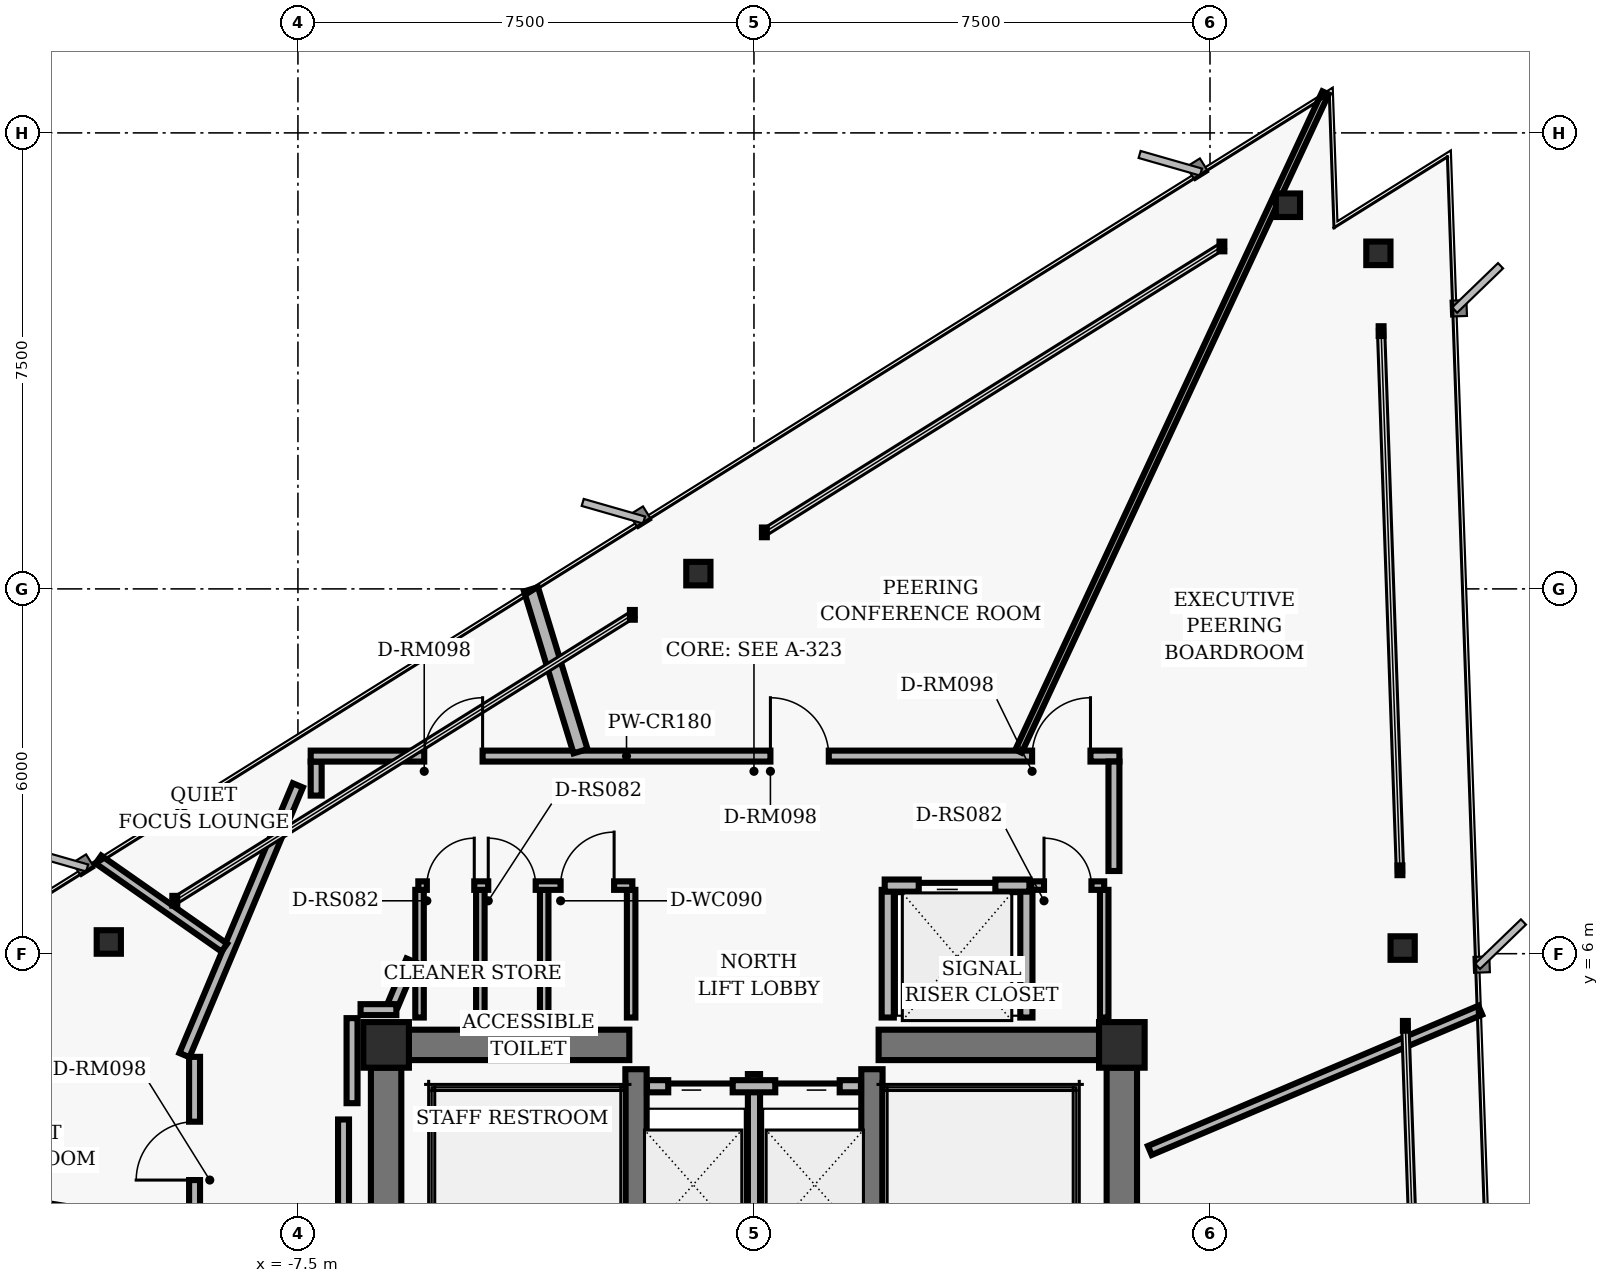
"""IFC4 building model, lengths in metres.
Left out: names, types, materials, properties, quantities, classifications, styles, units other than length and angle.
Written with IfcOpenShell. Run it as: python <this file> out.ifc"""

import sys

from ifc_helpers import new_model, si_unit, direction, frame, frame_2d, origin, origin_2d, place, context, subcontext, project, spatial, rectangle, hollow_rectangle, i_section, extrude, element, fill, save


model = new_model("IFC4")
c1 = context("Model", 3, precision=1e-05, world=origin(), true_north=direction((0.0, 1.0)))
c2 = subcontext(c1, "Body", "Model", "MODEL_VIEW")
j1 = project(units=[si_unit("LENGTHUNIT", "METRE"), si_unit("PLANEANGLEUNIT", "RADIAN")], contexts=[c1])
p1 = place(None, origin())
s1 = spatial("IfcSite", under=j1, at=p1, CompositionType="ELEMENT")
p2 = place(p1, origin())
s2 = spatial("IfcBuilding", under=s1, at=p2, CompositionType="ELEMENT")
p3 = place(p2, frame((0.0, 0.0, 199.68)))
s3 = spatial("IfcBuildingStorey", under=s2, at=p3, CompositionType="ELEMENT", Elevation=199.68)
for number, where, z_axis, x_axis in (
    (1, (-6.05, 4.5, 0.0), (0.0, 0.0, 1.0), (1.0, 0.0, 0.0)),
    (2, (6.05, 4.5, 0.0), (0.0, 0.0, 1.0), (1.0, 0.0, 0.0)),
):
    element("IfcColumn", number, at=place(p3, frame(where, z_axis=z_axis, x_axis=x_axis)), inside=s3, PredefinedType="COLUMN", context=c2, shape_type="SweptSolid", body=[
        extrude(hollow_rectangle(XDim=0.75, YDim=0.75, WallThickness=0.05, InnerFilletRadius=0.02, OuterFilletRadius=0.04, at=origin_2d()), origin(), (0.0, 0.0, 1.0), 3.04),
    ])
for number, where, z_axis, x_axis in (
    (3, (-6.05, 0.375, 0.0), (0.0, 0.0, 1.0), (0.0, 1.0, 0.0)),
    (4, (6.05, 0.375, 0.0), (0.0, 0.0, 1.0), (0.0, 1.0, 0.0)),
):
    element("IfcWall", number, at=place(p3, frame(where, z_axis=z_axis, x_axis=x_axis)), inside=s3, PredefinedType="SHEAR", context=c2, shape_type="SweptSolid", body=[
        extrude(rectangle(XDim=3.75, YDim=0.5, at=frame_2d((1.875, 0.0))), origin(), (0.0, 0.0, 1.0), 2.798),
    ])
for number, where, z_axis, x_axis in (
    (5, (-1.94, -4.1, 0.0), (0.0, 0.0, 1.0), (0.0, 1.0, 0.0)),
    (6, (1.94, -4.1, 0.0), (0.0, 0.0, 1.0), (0.0, 1.0, 0.0)),
):
    element("IfcWall", number, at=place(p3, frame(where, z_axis=z_axis, x_axis=x_axis)), inside=s3, PredefinedType="SHEAR", context=c2, shape_type="SweptSolid", body=[
        extrude(rectangle(XDim=8.2, YDim=0.35, at=frame_2d((4.1, 0.0))), origin(), (0.0, 0.0, 1.0), 2.798),
    ])
for number, where, z_axis, x_axis in (
    (7, (-5.675, 4.5, 0.0), (0.0, 0.0, 1.0), (1.0, 0.0, 0.0)),
    (8, (2.05, 4.5, 0.0), (0.0, 0.0, 1.0), (1.0, 0.0, 0.0)),
):
    element("IfcWall", number, at=place(p3, frame(where, z_axis=z_axis, x_axis=x_axis)), inside=s3, PredefinedType="SHEAR", context=c2, shape_type="SweptSolid", body=[
        extrude(rectangle(XDim=3.625, YDim=0.5, at=frame_2d((1.812, 0.0))), origin(), (0.0, 0.0, 1.0), 2.798),
    ])
for number, where, z_axis, x_axis in (
    (9, (10.668, 6.093, 0.0), (0.0, 0.0, 1.0), (1.0, 0.0, 0.0)),
    (10, (10.269, 17.519, 0.0), (0.0, 0.0, 1.0), (1.0, 0.0, 0.0)),
    (11, (8.781, 18.31, 0.0), (0.0, 0.0, 1.0), (1.0, 0.0, 0.0)),
    (12, (-0.915, 12.251, 0.0), (0.0, 0.0, 1.0), (1.0, 0.0, 0.0)),
    (13, (-10.611, 6.193, 0.0), (0.0, 0.0, 1.0), (1.0, 0.0, 0.0)),
):
    element("IfcColumn", number, at=place(p3, frame(where, z_axis=z_axis, x_axis=x_axis)), inside=s3, PredefinedType="COLUMN", context=c2, shape_type="SweptSolid", body=[
        extrude(i_section(OverallWidth=0.398, OverallDepth=0.387, WebThickness=0.021, FlangeThickness=0.033, FilletRadius=0.018, at=origin_2d()), origin(), (0.0, 0.0, 1.0), 3.04),
    ])
p4 = place(p3, frame((0.0, 1.25, 0.0), z_axis=(0.0, 0.0, 1.0), x_axis=(0.0, 1.0, 0.0)))
e14 = element("IfcWall", 14, at=p4, inside=s3, PredefinedType="PARTITIONING", context=c2, shape_type="SweptSolid", body=[
    extrude(rectangle(XDim=2.77, YDim=0.2, at=frame_2d((1.385, 0.0))), origin(), (0.0, 0.0, 1.0), 2.773),
])
p5 = place(p3, frame((-1.76, 3.82, 0.0), z_axis=(0.0, 0.0, 1.0), x_axis=(1.0, 0.0, 0.0)))
e15 = element("IfcWall", 15, at=p5, inside=s3, PredefinedType="PARTITIONING", context=c2, shape_type="SweptSolid", body=[
    extrude(rectangle(XDim=3.52, YDim=0.2, at=frame_2d((1.76, 0.0))), origin(), (0.0, 0.0, 1.0), 2.773),
])
p6 = place(p5, frame((0.35, 0.0, 0.0)))
e16 = element("IfcOpeningElement", 16, at=p6, cuts=e15, PredefinedType="OPENING", context=c2, shape_type="SweptSolid", body=[
    extrude(rectangle(XDim=1.06, YDim=2.04, at=frame_2d((0.53, 1.02))), frame((0.0, 0.11, 0.0), z_axis=(0.0, -1.0, 0.0), x_axis=(1.0, 0.0, 0.0)), (0.0, 0.0, 1.0), 0.22),
])
p7 = place(p5, frame((2.11, 0.0, 0.0)))
e17 = element("IfcOpeningElement", 17, at=p7, cuts=e15, PredefinedType="OPENING", context=c2, shape_type="SweptSolid", body=[
    extrude(rectangle(XDim=1.06, YDim=2.04, at=frame_2d((0.53, 1.02))), frame((0.0, 0.11, 0.0), z_axis=(0.0, -1.0, 0.0), x_axis=(1.0, 0.0, 0.0)), (0.0, 0.0, 1.0), 0.22),
])
for number, where, z_axis, x_axis in (
    (18, (2.2, 4.95, 0.0), (0.0, 0.0, 1.0), (0.0, 1.0, 0.0)),
    (19, (4.48, 4.95, 0.0), (0.0, 0.0, 1.0), (0.0, 1.0, 0.0)),
):
    element("IfcWall", number, at=place(p3, frame(where, z_axis=z_axis, x_axis=x_axis)), inside=s3, PredefinedType="PARTITIONING", context=c2, shape_type="SweptSolid", body=[
        extrude(rectangle(XDim=2.1, YDim=0.2, at=frame_2d((1.05, 0.0))), origin(), (0.0, 0.0, 1.0), 2.773),
    ])
p8 = place(p3, frame((2.15, 7.12, 0.0), z_axis=(0.0, 0.0, 1.0), x_axis=(1.0, 0.0, 0.0)))
e20 = element("IfcWall", 20, at=p8, inside=s3, PredefinedType="PARTITIONING", context=c2, shape_type="SweptSolid", body=[
    extrude(rectangle(XDim=2.38, YDim=0.2, at=frame_2d((1.19, 0.0))), origin(), (0.0, 0.0, 1.0), 2.773),
])
p9 = place(p8, frame((0.56, 0.0, 0.0)))
e21 = element("IfcOpeningElement", 21, at=p9, cuts=e20, PredefinedType="OPENING", context=c2, shape_type="SweptSolid", body=[
    extrude(rectangle(XDim=1.26, YDim=2.06, at=frame_2d((0.63, 1.03))), frame((0.0, 0.11, 0.0), z_axis=(0.0, -1.0, 0.0), x_axis=(1.0, 0.0, 0.0)), (0.0, 0.0, 1.0), 0.22),
])
for number, where, z_axis, x_axis in (
    (22, (-5.5, 4.95, 0.0), (0.0, 0.0, 1.0), (0.0, 1.0, 0.0)),
    (23, (-4.5, 4.95, 0.0), (0.0, 0.0, 1.0), (0.0, 1.0, 0.0)),
    (24, (-3.45, 4.95, 0.0), (0.0, 0.0, 1.0), (0.0, 1.0, 0.0)),
    (25, (-2.02, 4.95, 0.0), (0.0, 0.0, 1.0), (0.0, 1.0, 0.0)),
):
    element("IfcWall", number, at=place(p3, frame(where, z_axis=z_axis, x_axis=x_axis)), inside=s3, PredefinedType="PARTITIONING", context=c2, shape_type="SweptSolid", body=[
        extrude(rectangle(XDim=2.1, YDim=0.14, at=frame_2d((1.05, 0.0))), origin(), (0.0, 0.0, 1.0), 2.773),
    ])
p10 = place(p3, frame((-5.52, 7.12, 0.0), z_axis=(0.0, 0.0, 1.0), x_axis=(1.0, 0.0, 0.0)))
e26 = element("IfcWall", 26, at=p10, inside=s3, PredefinedType="PARTITIONING", context=c2, shape_type="SweptSolid", body=[
    extrude(rectangle(XDim=3.52, YDim=0.14, at=frame_2d((1.76, 0.0))), origin(), (0.0, 0.0, 1.0), 2.773),
])
p11 = place(p10, frame((0.14, 0.0, 0.0)))
e27 = element("IfcOpeningElement", 27, at=p11, cuts=e26, PredefinedType="OPENING", context=c2, shape_type="SweptSolid", body=[
    extrude(rectangle(XDim=0.78, YDim=2.01, at=frame_2d((0.39, 1.005))), frame((0.0, 0.08, 0.0), z_axis=(0.0, -1.0, 0.0), x_axis=(1.0, 0.0, 0.0)), (0.0, 0.0, 1.0), 0.16),
])
p12 = place(p10, frame((1.15, 0.0, 0.0)))
e28 = element("IfcOpeningElement", 28, at=p12, cuts=e26, PredefinedType="OPENING", context=c2, shape_type="SweptSolid", body=[
    extrude(rectangle(XDim=0.78, YDim=2.01, at=frame_2d((0.39, 1.005))), frame((0.0, 0.08, 0.0), z_axis=(0.0, -1.0, 0.0), x_axis=(1.0, 0.0, 0.0)), (0.0, 0.0, 1.0), 0.16),
])
p13 = place(p10, frame((2.34, 0.0, 0.0)))
e29 = element("IfcOpeningElement", 29, at=p13, cuts=e26, PredefinedType="OPENING", context=c2, shape_type="SweptSolid", body=[
    extrude(rectangle(XDim=0.88, YDim=2.02, at=frame_2d((0.44, 1.01))), frame((0.0, 0.08, 0.0), z_axis=(0.0, -1.0, 0.0), x_axis=(1.0, 0.0, 0.0)), (0.0, 0.0, 1.0), 0.16),
])
p14 = place(p3, frame((5.76, 4.95, 0.0), z_axis=(0.0, 0.0, 1.0), x_axis=(0.0, 1.0, 0.0)))
e30 = element("IfcWall", 30, at=p14, inside=s3, PredefinedType="PARTITIONING", context=c2, shape_type="SweptSolid", body=[
    extrude(rectangle(XDim=2.1, YDim=0.14, at=frame_2d((1.05, 0.0))), origin(), (0.0, 0.0, 1.0), 2.253),
])
p15 = place(p3, frame((4.56, 7.12, 0.0), z_axis=(0.0, 0.0, 1.0), x_axis=(1.0, 0.0, 0.0)))
e31 = element("IfcWall", 31, at=p15, inside=s3, PredefinedType="PARTITIONING", context=c2, shape_type="SweptSolid", body=[
    extrude(rectangle(XDim=1.2, YDim=0.14, at=frame_2d((0.6, 0.0))), origin(), (0.0, 0.0, 1.0), 2.773),
])
p16 = place(p15, frame((0.21, 0.0, 0.0)))
e32 = element("IfcOpeningElement", 32, at=p16, cuts=e31, PredefinedType="OPENING", context=c2, shape_type="SweptSolid", body=[
    extrude(rectangle(XDim=0.78, YDim=2.01, at=frame_2d((0.39, 1.005))), frame((0.0, 0.08, 0.0), z_axis=(0.0, -1.0, 0.0), x_axis=(1.0, 0.0, 0.0)), (0.0, 0.0, 1.0), 0.16),
])
p17 = place(p3, frame((-9.2, -4.303, 0.0), z_axis=(0.0, 0.0, 1.0), x_axis=(0.0, 1.0, 0.0)))
e33 = element("IfcWall", 33, at=p17, inside=s3, PredefinedType="PARTITIONING", context=c2, shape_type="SweptSolid", body=[
    extrude(rectangle(XDim=8.607, YDim=0.18, at=frame_2d((4.303, 0.0))), origin(), (0.0, 0.0, 1.0), 2.773),
])
p18 = place(p17, frame((1.721, 0.0, 0.0)))
e34 = element("IfcOpeningElement", 34, at=p18, cuts=e33, PredefinedType="OPENING", context=c2, shape_type="SweptSolid", body=[
    extrude(rectangle(XDim=0.96, YDim=2.02, at=frame_2d((0.48, 1.01))), frame((0.0, 0.1, 0.0), z_axis=(0.0, -1.0, 0.0), x_axis=(1.0, 0.0, 0.0)), (0.0, 0.0, 1.0), 0.2),
])
p19 = place(p17, frame((6.58, 0.0, 0.0)))
e35 = element("IfcOpeningElement", 35, at=p19, cuts=e33, PredefinedType="OPENING", context=c2, shape_type="SweptSolid", body=[
    extrude(rectangle(XDim=0.96, YDim=2.02, at=frame_2d((0.48, 1.01))), frame((0.0, 0.1, 0.0), z_axis=(0.0, -1.0, 0.0), x_axis=(1.0, 0.0, 0.0)), (0.0, 0.0, 1.0), 0.2),
])
p20 = place(p17, frame((4.367, 0.0, 0.0)))
e36 = element("IfcOpeningElement", 36, at=p20, cuts=e33, PredefinedType="OPENING", context=c2, shape_type="SweptSolid", body=[
    extrude(rectangle(XDim=1.18, YDim=2.02, at=frame_2d((0.59, 1.01))), frame((0.0, 0.1, 0.0), z_axis=(0.0, -1.0, 0.0), x_axis=(1.0, 0.0, 0.0)), (0.0, 0.0, 1.0), 0.2),
])
p21 = place(p3, frame((-9.367, 4.332, 0.0), z_axis=(0.0, 0.0, 1.0), x_axis=(0.387573945081, 0.921838617706, 0.0)))
e37 = element("IfcWall", 37, at=p21, inside=s3, PredefinedType="PARTITIONING", context=c2, shape_type="SweptSolid", body=[
    extrude(rectangle(XDim=4.813, YDim=0.18, at=frame_2d((2.407, 0.0))), origin(), (0.0, 0.0, 1.0), 2.773),
])
p22 = place(p3, frame((-7.2, 8.601, 0.0), z_axis=(0.0, 0.0, 1.0), x_axis=(0.0, 1.0, 0.0)))
e38 = element("IfcWall", 38, at=p22, inside=s3, PredefinedType="PARTITIONING", context=c2, shape_type="SweptSolid", body=[
    extrude(rectangle(XDim=0.559, YDim=0.18, at=frame_2d((0.28, 0.0))), origin(), (0.0, 0.0, 1.0), 2.773),
])
p23 = place(p3, frame((-7.29, 9.25, 0.0), z_axis=(0.0, 0.0, 1.0), x_axis=(1.0, 0.0, 0.0)))
e39 = element("IfcWall", 39, at=p23, inside=s3, PredefinedType="PARTITIONING", context=c2, shape_type="SweptSolid", body=[
    extrude(rectangle(XDim=13.3, YDim=0.18, at=frame_2d((6.65, 0.0))), origin(), (0.0, 0.0, 1.0), 2.773),
])
p24 = place(p23, frame((11.864, 0.0, 0.0)))
e40 = element("IfcOpeningElement", 40, at=p24, cuts=e39, PredefinedType="OPENING", context=c2, shape_type="SweptSolid", body=[
    extrude(rectangle(XDim=0.96, YDim=2.02, at=frame_2d((0.48, 1.01))), frame((0.0, 0.1, 0.0), z_axis=(0.0, -1.0, 0.0), x_axis=(1.0, 0.0, 0.0)), (0.0, 0.0, 1.0), 0.2),
])
p25 = place(p23, frame((7.561, 0.0, 0.0)))
e41 = element("IfcOpeningElement", 41, at=p25, cuts=e39, PredefinedType="OPENING", context=c2, shape_type="SweptSolid", body=[
    extrude(rectangle(XDim=0.96, YDim=2.02, at=frame_2d((0.48, 1.01))), frame((0.0, 0.1, 0.0), z_axis=(0.0, -1.0, 0.0), x_axis=(1.0, 0.0, 0.0)), (0.0, 0.0, 1.0), 0.2),
])
p26 = place(p23, frame((1.867, 0.0, 0.0)))
e42 = element("IfcOpeningElement", 42, at=p26, cuts=e39, PredefinedType="OPENING", context=c2, shape_type="SweptSolid", body=[
    extrude(rectangle(XDim=0.96, YDim=2.02, at=frame_2d((0.48, 1.01))), frame((0.0, 0.1, 0.0), z_axis=(0.0, -1.0, 0.0), x_axis=(1.0, 0.0, 0.0)), (0.0, 0.0, 1.0), 0.2),
])
p27 = place(p3, frame((5.92, 9.16, 0.0), z_axis=(0.0, 0.0, 1.0), x_axis=(0.0, -1.0, 0.0)))
e43 = element("IfcWall", 43, at=p27, inside=s3, PredefinedType="PARTITIONING", context=c2, shape_type="SweptSolid", body=[
    extrude(rectangle(XDim=1.8, YDim=0.18, at=frame_2d((0.9, 0.0))), origin(), (0.0, 0.0, 1.0), 2.773),
])
p28 = place(p3, frame((-5.632, 5.887, 0.0), z_axis=(0.0, 0.0, 1.0), x_axis=(-0.387792833522, -0.921746558588, 0.0)))
e44 = element("IfcWall", 44, at=p28, inside=s3, PredefinedType="PARTITIONING", context=c2, shape_type="SweptSolid", body=[
    extrude(rectangle(XDim=0.785, YDim=0.18, at=frame_2d((0.393, 0.0))), origin(), (0.0, 0.0, 1.0), 2.773),
])
p29 = place(p3, frame((-5.881, 5.08, 0.0), z_axis=(0.0, 0.0, 1.0), x_axis=(-1.0, 0.0, 0.0)))
e45 = element("IfcWall", 45, at=p29, inside=s3, PredefinedType="PARTITIONING", context=c2, shape_type="SweptSolid", body=[
    extrude(rectangle(XDim=0.589, YDim=0.18, at=frame_2d((0.294, 0.0))), origin(), (0.0, 0.0, 1.0), 2.773),
])
p30 = place(p3, frame((-6.61, 4.94, 0.0), z_axis=(0.0, 0.0, 1.0), x_axis=(0.0, -1.0, 0.0)))
e46 = element("IfcWall", 46, at=p30, inside=s3, PredefinedType="PARTITIONING", context=c2, shape_type="SweptSolid", body=[
    extrude(rectangle(XDim=1.399, YDim=0.18, at=frame_2d((0.699, 0.0))), origin(), (0.0, 0.0, 1.0), 2.773),
])
p31 = place(p3, frame((-6.75, 3.273, 0.0), z_axis=(0.0, 0.0, 1.0), x_axis=(0.0, -1.0, 0.0)))
e47 = element("IfcWall", 47, at=p31, inside=s3, PredefinedType="PARTITIONING", context=c2, shape_type="SweptSolid", body=[
    extrude(rectangle(XDim=6.547, YDim=0.18, at=frame_2d((3.273, 0.0))), origin(), (0.0, 0.0, 1.0), 2.773),
])
p32 = place(p3, frame((6.51, 2.763, 0.0), z_axis=(0.0, 0.0, 1.0), x_axis=(0.920487144923, 0.390772844543, 0.0)))
e48 = element("IfcWall", 48, at=p32, inside=s3, PredefinedType="PARTITIONING", context=c2, shape_type="SweptSolid", body=[
    extrude(rectangle(XDim=5.904, YDim=0.16, at=frame_2d((2.952, 0.0))), origin(), (0.0, 0.0, 1.0), 2.773),
])
p33 = place(p3, frame((4.351, 9.33, 0.0), z_axis=(0.0, 0.0, 1.0), x_axis=(0.422616983209, 0.906308383225, 0.0)))
e49 = element("IfcWall", 49, at=p33, inside=s3, PredefinedType="MOVABLE", context=c2, shape_type="SweptSolid", body=[
    extrude(rectangle(XDim=11.948, YDim=0.115, at=frame_2d((5.974, 0.0))), origin(), (0.0, 0.0, 1.0), 2.253),
])
p34 = place(p3, frame((-2.853, 9.33, 0.0), z_axis=(0.0, 0.0, 1.0), x_axis=(-0.292329881005, 0.956317541757, 0.0)))
e50 = element("IfcWall", 50, at=p34, inside=s3, PredefinedType="PARTITIONING", context=c2, shape_type="SweptSolid", body=[
    extrude(rectangle(XDim=2.785, YDim=0.24, at=frame_2d((1.393, 0.0))), origin(), (0.0, 0.0, 1.0), 2.773),
])
p35 = place(p3, frame((-8.71, 6.099, 0.0), z_axis=(0.0, 0.0, 1.0), x_axis=(-0.819154754917, 0.573572565154, 0.0)))
e51 = element("IfcWall", 51, at=p35, inside=s3, PredefinedType="PARTITIONING", context=c2, shape_type="SweptSolid", body=[
    extrude(rectangle(XDim=2.527, YDim=0.16, at=frame_2d((1.264, 0.0))), origin(), (0.0, 0.0, 1.0), 2.773),
])
p36 = place(p3, frame((-9.28, 1.47, 0.0), z_axis=(0.0, 0.0, 1.0), x_axis=(-0.987686019225, 0.156449120891, 0.0)))
e52 = element("IfcWall", 52, at=p36, inside=s3, PredefinedType="MOVABLE", context=c2, shape_type="SweptSolid", body=[
    extrude(rectangle(XDim=9.07, YDim=0.115, at=frame_2d((4.535, 0.0))), origin(), (0.0, 0.0, 1.0), 2.773),
])
p37 = place(p6, origin())
e53 = element("IfcDoor", 53, at=p37, inside=s3, OperationType="SLIDING_TO_LEFT", PredefinedType="DOOR", context=c2, shape_type="SweptSolid", body=[
    extrude(rectangle(XDim=1.06, YDim=2.04, at=frame_2d((0.53, 1.02))), frame((0.0, 0.025, 0.0), z_axis=(0.0, -1.0, 0.0), x_axis=(1.0, 0.0, 0.0)), (0.0, 0.0, 1.0), 0.05),
])
fill(e16, e53)
p38 = place(p7, origin())
e54 = element("IfcDoor", 54, at=p38, inside=s3, OperationType="SLIDING_TO_RIGHT", PredefinedType="DOOR", context=c2, shape_type="SweptSolid", body=[
    extrude(rectangle(XDim=1.06, YDim=2.04, at=frame_2d((0.53, 1.02))), frame((0.0, 0.025, 0.0), z_axis=(0.0, -1.0, 0.0), x_axis=(1.0, 0.0, 0.0)), (0.0, 0.0, 1.0), 0.05),
])
fill(e17, e54)
p39 = place(p9, origin())
e55 = element("IfcDoor", 55, at=p39, inside=s3, OperationType="SLIDING_TO_LEFT", PredefinedType="DOOR", context=c2, shape_type="SweptSolid", body=[
    extrude(rectangle(XDim=1.26, YDim=2.06, at=frame_2d((0.63, 1.03))), frame((0.0, 0.025, 0.0), z_axis=(0.0, -1.0, 0.0), x_axis=(1.0, 0.0, 0.0)), (0.0, 0.0, 1.0), 0.05),
])
fill(e21, e55)
p40 = place(p11, origin())
e56 = element("IfcDoor", 56, at=p40, inside=s3, OperationType="SINGLE_SWING_RIGHT", PredefinedType="DOOR", context=c2, shape_type="SweptSolid", body=[
    extrude(rectangle(XDim=0.78, YDim=2.01, at=frame_2d((0.39, 1.005))), frame((0.0, 0.025, 0.0), z_axis=(0.0, -1.0, 0.0), x_axis=(1.0, 0.0, 0.0)), (0.0, 0.0, 1.0), 0.05),
])
fill(e27, e56)
p41 = place(p12, origin())
e57 = element("IfcDoor", 57, at=p41, inside=s3, OperationType="SINGLE_SWING_LEFT", PredefinedType="DOOR", context=c2, shape_type="SweptSolid", body=[
    extrude(rectangle(XDim=0.78, YDim=2.01, at=frame_2d((0.39, 1.005))), frame((0.0, 0.025, 0.0), z_axis=(0.0, -1.0, 0.0), x_axis=(1.0, 0.0, 0.0)), (0.0, 0.0, 1.0), 0.05),
])
fill(e28, e57)
p42 = place(p13, origin())
e58 = element("IfcDoor", 58, at=p42, inside=s3, OperationType="SINGLE_SWING_RIGHT", PredefinedType="DOOR", context=c2, shape_type="SweptSolid", body=[
    extrude(rectangle(XDim=0.88, YDim=2.02, at=frame_2d((0.44, 1.01))), frame((0.0, 0.025, 0.0), z_axis=(0.0, -1.0, 0.0), x_axis=(1.0, 0.0, 0.0)), (0.0, 0.0, 1.0), 0.05),
])
fill(e29, e58)
p43 = place(p16, origin())
e59 = element("IfcDoor", 59, at=p43, inside=s3, OperationType="SINGLE_SWING_LEFT", PredefinedType="DOOR", context=c2, shape_type="SweptSolid", body=[
    extrude(rectangle(XDim=0.78, YDim=2.01, at=frame_2d((0.39, 1.005))), frame((0.0, 0.025, 0.0), z_axis=(0.0, -1.0, 0.0), x_axis=(1.0, 0.0, 0.0)), (0.0, 0.0, 1.0), 0.05),
])
fill(e32, e59)
p44 = place(p24, origin())
e60 = element("IfcDoor", 60, at=p44, inside=s3, OperationType="SINGLE_SWING_RIGHT", PredefinedType="DOOR", context=c2, shape_type="SweptSolid", body=[
    extrude(rectangle(XDim=0.96, YDim=2.02, at=frame_2d((0.48, 1.01))), frame((0.0, 0.025, 0.0), z_axis=(0.0, -1.0, 0.0), x_axis=(1.0, 0.0, 0.0)), (0.0, 0.0, 1.0), 0.05),
])
fill(e40, e60)
p45 = place(p25, origin())
e61 = element("IfcDoor", 61, at=p45, inside=s3, OperationType="SINGLE_SWING_LEFT", PredefinedType="DOOR", context=c2, shape_type="SweptSolid", body=[
    extrude(rectangle(XDim=0.96, YDim=2.02, at=frame_2d((0.48, 1.01))), frame((0.0, 0.025, 0.0), z_axis=(0.0, -1.0, 0.0), x_axis=(1.0, 0.0, 0.0)), (0.0, 0.0, 1.0), 0.05),
])
fill(e41, e61)
p46 = place(p26, origin())
e62 = element("IfcDoor", 62, at=p46, inside=s3, OperationType="SINGLE_SWING_RIGHT", PredefinedType="DOOR", context=c2, shape_type="SweptSolid", body=[
    extrude(rectangle(XDim=0.96, YDim=2.02, at=frame_2d((0.48, 1.01))), frame((0.0, 0.025, 0.0), z_axis=(0.0, -1.0, 0.0), x_axis=(1.0, 0.0, 0.0)), (0.0, 0.0, 1.0), 0.05),
])
fill(e42, e62)
p47 = place(p19, origin())
e63 = element("IfcDoor", 63, at=p47, inside=s3, OperationType="SINGLE_SWING_LEFT", PredefinedType="DOOR", context=c2, shape_type="SweptSolid", body=[
    extrude(rectangle(XDim=0.96, YDim=2.02, at=frame_2d((0.48, 1.01))), frame((0.0, 0.025, 0.0), z_axis=(0.0, -1.0, 0.0), x_axis=(1.0, 0.0, 0.0)), (0.0, 0.0, 1.0), 0.05),
])
fill(e35, e63)
save(model, sys.argv[1])
